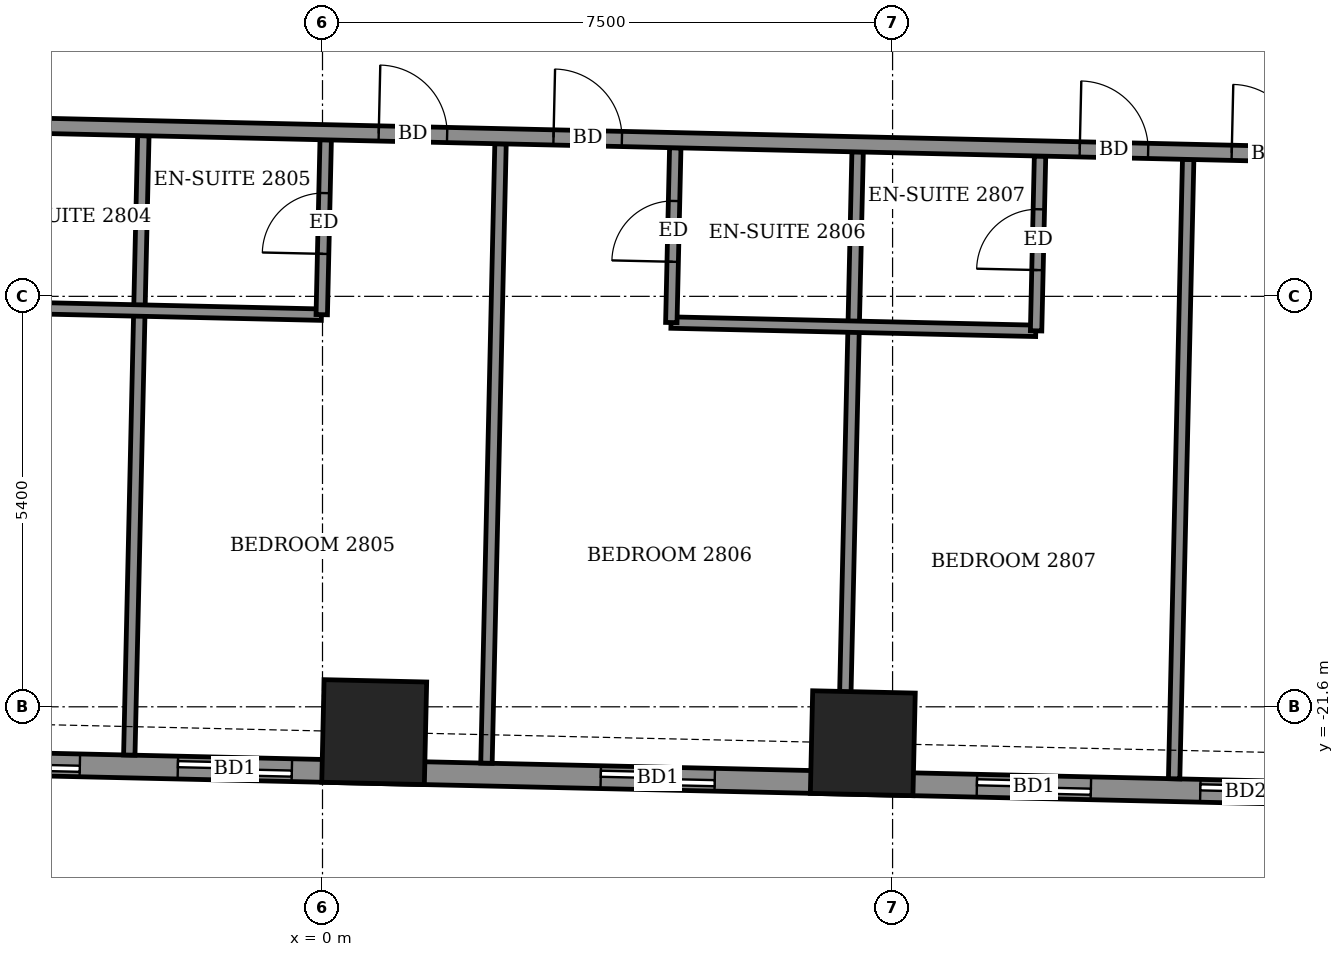
"""IFC4 building model, lengths in metres.
Left out: names, types, materials, properties, quantities, classifications, styles, units other than length and angle.
Written with IfcOpenShell. Run it as: python <this file> out.ifc"""

import sys

from ifc_helpers import new_model, si_unit, direction, frame, frame_2d, origin, origin_2d, place, context, subcontext, project, spatial, rectangle, extrude, element, fill, save


model = new_model("IFC4")
c1 = context("Model", 3, precision=1e-05, world=origin(), true_north=direction((0.0, 1.0)))
c2 = subcontext(c1, "Body", "Model", "MODEL_VIEW")
j1 = project(units=[si_unit("LENGTHUNIT", "METRE"), si_unit("PLANEANGLEUNIT", "RADIAN")], contexts=[c1])
p1 = place(None, origin())
s1 = spatial("IfcSite", under=j1, at=p1, CompositionType="ELEMENT")
p2 = place(p1, origin())
s2 = spatial("IfcBuilding", under=s1, at=p2, CompositionType="ELEMENT")
p3 = place(p2, frame((0.0, 0.0, 112.7)))
s3 = spatial("IfcBuildingStorey", under=s2, at=p3, CompositionType="ELEMENT", Elevation=112.7)
for number, where, z_axis, x_axis in (
    (1, (0.68, -21.933, -0.55), (0.0, 0.0, 1.0), (1.0, -0.023, 0.0)),
    (2, (7.108, -22.079, -0.55), (0.0, 0.0, 1.0), (1.0, -0.023, 0.0)),
):
    element("IfcColumn", number, at=place(p3, frame(where, z_axis=z_axis, x_axis=x_axis)), inside=s3, PredefinedType="COLUMN", context=c2, shape_type="SweptSolid", body=[
        extrude(rectangle(XDim=1.35, YDim=1.35, at=origin_2d()), origin(), (0.0, 0.0, 1.0), 3.6),
    ])
p4 = place(p3, frame((-24.894, -21.878, 0.0), z_axis=(0.0, 0.0, 1.0), x_axis=(0.999742689045, -0.022683820265, 0.0)))
e3 = element("IfcWall", 3, at=p4, inside=s3, PredefinedType="SOLIDWALL", context=c2, shape_type="SweptSolid", body=[
    extrude(rectangle(XDim=44.708, YDim=0.3, at=frame_2d((22.354, 0.0))), origin(), (0.0, 0.0, 1.0), 3.05),
])
p5 = place(p4, frame((1.902, 0.0, 0.0)))
e4 = element("IfcOpeningElement", 4, at=p5, cuts=e3, PredefinedType="OPENING", context=c2, shape_type="SweptSolid", body=[
    extrude(rectangle(XDim=1.5, YDim=2.4, at=frame_2d((0.75, 1.2))), frame((0.0, 0.16, 0.0), z_axis=(0.0, -1.0, 0.0), x_axis=(1.0, 0.0, 0.0)), (0.0, 0.0, 1.0), 0.32),
])
p6 = place(p4, frame((7.178, 0.0, 0.0)))
e5 = element("IfcOpeningElement", 5, at=p6, cuts=e3, PredefinedType="OPENING", context=c2, shape_type="SweptSolid", body=[
    extrude(rectangle(XDim=1.2, YDim=2.4, at=frame_2d((0.6, 1.2))), frame((0.0, 0.16, 0.0), z_axis=(0.0, -1.0, 0.0), x_axis=(1.0, 0.0, 0.0)), (0.0, 0.0, 1.0), 0.32),
])
p7 = place(p4, frame((9.817, 0.0, 0.0)))
e6 = element("IfcOpeningElement", 6, at=p7, cuts=e3, PredefinedType="OPENING", context=c2, shape_type="SweptSolid", body=[
    extrude(rectangle(XDim=1.5, YDim=2.4, at=frame_2d((0.75, 1.2))), frame((0.0, 0.16, 0.0), z_axis=(0.0, -1.0, 0.0), x_axis=(1.0, 0.0, 0.0)), (0.0, 0.0, 1.0), 0.32),
])
p8 = place(p4, frame((14.9, 0.0, 0.0)))
e7 = element("IfcOpeningElement", 7, at=p8, cuts=e3, PredefinedType="OPENING", context=c2, shape_type="SweptSolid", body=[
    extrude(rectangle(XDim=1.5, YDim=2.4, at=frame_2d((0.75, 1.2))), frame((0.0, 0.16, 0.0), z_axis=(0.0, -1.0, 0.0), x_axis=(1.0, 0.0, 0.0)), (0.0, 0.0, 1.0), 0.32),
])
p9 = place(p4, frame((20.207, 0.0, 0.0)))
e8 = element("IfcOpeningElement", 8, at=p9, cuts=e3, PredefinedType="OPENING", context=c2, shape_type="SweptSolid", body=[
    extrude(rectangle(XDim=1.5, YDim=2.4, at=frame_2d((0.75, 1.2))), frame((0.0, 0.16, 0.0), z_axis=(0.0, -1.0, 0.0), x_axis=(1.0, 0.0, 0.0)), (0.0, 0.0, 1.0), 0.32),
])
p10 = place(p4, frame((22.997, 0.0, 0.0)))
e9 = element("IfcOpeningElement", 9, at=p10, cuts=e3, PredefinedType="OPENING", context=c2, shape_type="SweptSolid", body=[
    extrude(rectangle(XDim=1.5, YDim=2.4, at=frame_2d((0.75, 1.2))), frame((0.0, 0.16, 0.0), z_axis=(0.0, -1.0, 0.0), x_axis=(1.0, 0.0, 0.0)), (0.0, 0.0, 1.0), 0.32),
])
p11 = place(p4, frame((28.562, 0.0, 0.0)))
e10 = element("IfcOpeningElement", 10, at=p11, cuts=e3, PredefinedType="OPENING", context=c2, shape_type="SweptSolid", body=[
    extrude(rectangle(XDim=1.5, YDim=2.4, at=frame_2d((0.75, 1.2))), frame((0.0, 0.16, 0.0), z_axis=(0.0, -1.0, 0.0), x_axis=(1.0, 0.0, 0.0)), (0.0, 0.0, 1.0), 0.32),
])
p12 = place(p4, frame((33.512, 0.0, 0.0)))
e11 = element("IfcOpeningElement", 11, at=p12, cuts=e3, PredefinedType="OPENING", context=c2, shape_type="SweptSolid", body=[
    extrude(rectangle(XDim=1.5, YDim=2.4, at=frame_2d((0.75, 1.2))), frame((0.0, 0.16, 0.0), z_axis=(0.0, -1.0, 0.0), x_axis=(1.0, 0.0, 0.0)), (0.0, 0.0, 1.0), 0.32),
])
p13 = place(p4, frame((36.452, 0.0, 0.0)))
e12 = element("IfcOpeningElement", 12, at=p13, cuts=e3, PredefinedType="OPENING", context=c2, shape_type="SweptSolid", body=[
    extrude(rectangle(XDim=1.2, YDim=2.4, at=frame_2d((0.6, 1.2))), frame((0.0, 0.16, 0.0), z_axis=(0.0, -1.0, 0.0), x_axis=(1.0, 0.0, 0.0)), (0.0, 0.0, 1.0), 0.32),
])
p14 = place(p4, frame((40.923, 0.0, 0.9)))
e13 = element("IfcOpeningElement", 13, at=p14, cuts=e3, PredefinedType="OPENING", context=c2, shape_type="SweptSolid", body=[
    extrude(rectangle(XDim=2.4, YDim=1.5, at=frame_2d((1.2, 0.75))), frame((0.0, 0.16, 0.0), z_axis=(0.0, -1.0, 0.0), x_axis=(1.0, 0.0, 0.0)), (0.0, 0.0, 1.0), 0.32),
])
p15 = place(p3, frame((-2.542, -22.235, 0.0), z_axis=(0.0, 0.0, 1.0), x_axis=(0.022705755232, 0.999742191107, 0.0)))
e14 = element("IfcWall", 14, at=p15, inside=s3, PredefinedType="PARTITIONING", context=c2, shape_type="SweptSolid", body=[
    extrude(rectangle(XDim=8.15, YDim=0.15, at=frame_2d((4.075, 0.0))), origin(), (0.0, 0.0, 1.0), 2.55),
])
p16 = place(p3, frame((2.157, -22.342, 0.0), z_axis=(0.0, 0.0, 1.0), x_axis=(0.022706435224, 0.999742175663, 0.0)))
e15 = element("IfcWall", 15, at=p16, inside=s3, PredefinedType="PARTITIONING", context=c2, shape_type="SweptSolid", body=[
    extrude(rectangle(XDim=8.15, YDim=0.15, at=frame_2d((4.075, 0.0))), origin(), (0.0, 0.0, 1.0), 2.55),
])
p17 = place(p3, frame((6.855, -22.448, 0.0), z_axis=(0.0, 0.0, 1.0), x_axis=(0.022706435224, 0.999742175663, 0.0)))
e16 = element("IfcWall", 16, at=p17, inside=s3, PredefinedType="PARTITIONING", context=c2, shape_type="SweptSolid", body=[
    extrude(rectangle(XDim=8.15, YDim=0.15, at=frame_2d((4.075, 0.0))), origin(), (0.0, 0.0, 1.0), 3.05),
])
p18 = place(p3, frame((11.204, -22.547, 0.0), z_axis=(0.0, 0.0, 1.0), x_axis=(0.022675815822, 0.999742870631, 0.0)))
e17 = element("IfcWall", 17, at=p18, inside=s3, PredefinedType="PARTITIONING", context=c2, shape_type="SweptSolid", body=[
    extrude(rectangle(XDim=8.15, YDim=0.15, at=frame_2d((4.075, 0.0))), origin(), (0.0, 0.0, 1.0), 2.55),
])
p19 = place(p3, frame((-4.813, -16.332, 0.0), z_axis=(0.0, 0.0, 1.0), x_axis=(0.999742701292, -0.022683280499, 0.0)))
e18 = element("IfcWall", 18, at=p19, inside=s3, PredefinedType="PARTITIONING", context=c2, shape_type="SweptSolid", body=[
    extrude(rectangle(XDim=4.8, YDim=0.15, at=frame_2d((2.4, 0.0))), origin(), (0.0, 0.0, 1.0), 3.05),
])
p20 = place(p3, frame((-0.01, -16.441, 0.0), z_axis=(0.0, 0.0, 1.0), x_axis=(0.022605686808, 0.999744458811, 0.0)))
e19 = element("IfcWall", 19, at=p20, inside=s3, PredefinedType="PARTITIONING", context=c2, shape_type="SweptSolid", body=[
    extrude(rectangle(XDim=2.3, YDim=0.15, at=frame_2d((1.15, 0.0))), origin(), (0.0, 0.0, 1.0), 3.05),
])
p21 = place(p20, frame((0.8, 0.0, 0.0)))
e20 = element("IfcOpeningElement", 20, at=p21, cuts=e19, PredefinedType="OPENING", context=c2, shape_type="SweptSolid", body=[
    extrude(rectangle(XDim=0.8, YDim=2.1, at=frame_2d((0.4, 1.05))), frame((0.0, 0.085, 0.0), z_axis=(0.0, -1.0, 0.0), x_axis=(1.0, 0.0, 0.0)), (0.0, 0.0, 1.0), 0.17),
])
p22 = place(p3, frame((4.585, -16.545, 0.0), z_axis=(0.0, 0.0, 1.0), x_axis=(0.99974154664, -0.022734113616, 0.0)))
e21 = element("IfcWall", 21, at=p22, inside=s3, PredefinedType="PARTITIONING", context=c2, shape_type="SweptSolid", body=[
    extrude(rectangle(XDim=4.8, YDim=0.15, at=frame_2d((2.4, 0.0))), origin(), (0.0, 0.0, 1.0), 3.05),
])
p23 = place(p3, frame((4.589, -16.545, 0.0), z_axis=(0.0, 0.0, 1.0), x_axis=(0.022615284993, 0.999744241736, 0.0)))
e22 = element("IfcWall", 22, at=p23, inside=s3, PredefinedType="PARTITIONING", context=c2, shape_type="SweptSolid", body=[
    extrude(rectangle(XDim=2.299, YDim=0.15, at=frame_2d((1.15, 0.0))), origin(), (0.0, 0.0, 1.0), 3.05),
])
p24 = place(p23, frame((0.8, 0.0, 0.0)))
e23 = element("IfcOpeningElement", 23, at=p24, cuts=e22, PredefinedType="OPENING", context=c2, shape_type="SweptSolid", body=[
    extrude(rectangle(XDim=0.8, YDim=2.1, at=frame_2d((0.4, 1.05))), frame((0.0, 0.085, 0.0), z_axis=(0.0, -1.0, 0.0), x_axis=(1.0, 0.0, 0.0)), (0.0, 0.0, 1.0), 0.17),
])
p25 = place(p3, frame((9.388, -16.654, 0.0), z_axis=(0.0, 0.0, 1.0), x_axis=(0.022612884682, 0.999744296031, 0.0)))
e24 = element("IfcWall", 24, at=p25, inside=s3, PredefinedType="PARTITIONING", context=c2, shape_type="SweptSolid", body=[
    extrude(rectangle(XDim=2.3, YDim=0.15, at=frame_2d((1.15, 0.0))), origin(), (0.0, 0.0, 1.0), 3.05),
])
p26 = place(p25, frame((0.8, 0.0, 0.0)))
e25 = element("IfcOpeningElement", 25, at=p26, cuts=e24, PredefinedType="OPENING", context=c2, shape_type="SweptSolid", body=[
    extrude(rectangle(XDim=0.8, YDim=2.1, at=frame_2d((0.4, 1.05))), frame((0.0, 0.085, 0.0), z_axis=(0.0, -1.0, 0.0), x_axis=(1.0, 0.0, 0.0)), (0.0, 0.0, 1.0), 0.17),
])
p27 = place(p3, frame((-26.978, -13.428, 0.0), z_axis=(0.0, 0.0, 1.0), x_axis=(0.999742553034, -0.02268981385, 0.0)))
e26 = element("IfcWall", 26, at=p27, inside=s3, PredefinedType="PARTITIONING", context=c2, shape_type="SweptSolid", body=[
    extrude(rectangle(XDim=50.733, YDim=0.2, at=frame_2d((25.366, 0.0))), origin(), (0.0, 0.0, 1.0), 3.05),
])
p28 = place(p27, frame((2.293, 0.0, 0.0)))
e27 = element("IfcOpeningElement", 27, at=p28, cuts=e26, PredefinedType="OPENING", context=c2, shape_type="SweptSolid", body=[
    extrude(rectangle(XDim=1.0, YDim=2.1, at=frame_2d((0.5, 1.05))), frame((0.0, 0.11, 0.0), z_axis=(0.0, -1.0, 0.0), x_axis=(1.0, 0.0, 0.0)), (0.0, 0.0, 1.0), 0.22),
])
p29 = place(p27, frame((9.65, 0.0, 0.0)))
e28 = element("IfcOpeningElement", 28, at=p29, cuts=e26, PredefinedType="OPENING", context=c2, shape_type="SweptSolid", body=[
    extrude(rectangle(XDim=0.9, YDim=2.1, at=frame_2d((0.45, 1.05))), frame((0.0, 0.11, 0.0), z_axis=(0.0, -1.0, 0.0), x_axis=(1.0, 0.0, 0.0)), (0.0, 0.0, 1.0), 0.22),
])
p30 = place(p27, frame((11.75, 0.0, 0.0)))
e29 = element("IfcOpeningElement", 29, at=p30, cuts=e26, PredefinedType="OPENING", context=c2, shape_type="SweptSolid", body=[
    extrude(rectangle(XDim=0.9, YDim=2.1, at=frame_2d((0.45, 1.05))), frame((0.0, 0.11, 0.0), z_axis=(0.0, -1.0, 0.0), x_axis=(1.0, 0.0, 0.0)), (0.0, 0.0, 1.0), 0.22),
])
p31 = place(p27, frame((18.675, 0.0, 0.0)))
e30 = element("IfcOpeningElement", 30, at=p31, cuts=e26, PredefinedType="OPENING", context=c2, shape_type="SweptSolid", body=[
    extrude(rectangle(XDim=0.9, YDim=2.1, at=frame_2d((0.45, 1.05))), frame((0.0, 0.11, 0.0), z_axis=(0.0, -1.0, 0.0), x_axis=(1.0, 0.0, 0.0)), (0.0, 0.0, 1.0), 0.22),
])
p32 = place(p27, frame((20.75, 0.0, 0.0)))
e31 = element("IfcOpeningElement", 31, at=p32, cuts=e26, PredefinedType="OPENING", context=c2, shape_type="SweptSolid", body=[
    extrude(rectangle(XDim=0.9, YDim=2.1, at=frame_2d((0.45, 1.05))), frame((0.0, 0.11, 0.0), z_axis=(0.0, -1.0, 0.0), x_axis=(1.0, 0.0, 0.0)), (0.0, 0.0, 1.0), 0.22),
])
p33 = place(p27, frame((27.725, 0.0, 0.0)))
e32 = element("IfcOpeningElement", 32, at=p33, cuts=e26, PredefinedType="OPENING", context=c2, shape_type="SweptSolid", body=[
    extrude(rectangle(XDim=0.9, YDim=2.1, at=frame_2d((0.45, 1.05))), frame((0.0, 0.11, 0.0), z_axis=(0.0, -1.0, 0.0), x_axis=(1.0, 0.0, 0.0)), (0.0, 0.0, 1.0), 0.22),
])
p34 = place(p27, frame((30.025, 0.0, 0.0)))
e33 = element("IfcOpeningElement", 33, at=p34, cuts=e26, PredefinedType="OPENING", context=c2, shape_type="SweptSolid", body=[
    extrude(rectangle(XDim=0.9, YDim=2.1, at=frame_2d((0.45, 1.05))), frame((0.0, 0.11, 0.0), z_axis=(0.0, -1.0, 0.0), x_axis=(1.0, 0.0, 0.0)), (0.0, 0.0, 1.0), 0.22),
])
p35 = place(p27, frame((36.95, 0.0, 0.0)))
e34 = element("IfcOpeningElement", 34, at=p35, cuts=e26, PredefinedType="OPENING", context=c2, shape_type="SweptSolid", body=[
    extrude(rectangle(XDim=0.9, YDim=2.1, at=frame_2d((0.45, 1.05))), frame((0.0, 0.11, 0.0), z_axis=(0.0, -1.0, 0.0), x_axis=(1.0, 0.0, 0.0)), (0.0, 0.0, 1.0), 0.22),
])
p36 = place(p27, frame((38.95, 0.0, 0.0)))
e35 = element("IfcOpeningElement", 35, at=p36, cuts=e26, PredefinedType="OPENING", context=c2, shape_type="SweptSolid", body=[
    extrude(rectangle(XDim=0.9, YDim=2.1, at=frame_2d((0.45, 1.05))), frame((0.0, 0.11, 0.0), z_axis=(0.0, -1.0, 0.0), x_axis=(1.0, 0.0, 0.0)), (0.0, 0.0, 1.0), 0.22),
])
p37 = place(p27, frame((48.179, 0.0, 0.0)))
e36 = element("IfcOpeningElement", 36, at=p37, cuts=e26, PredefinedType="OPENING", context=c2, shape_type="SweptSolid", body=[
    extrude(rectangle(XDim=1.0, YDim=2.1, at=frame_2d((0.5, 1.05))), frame((0.0, 0.11, 0.0), z_axis=(0.0, -1.0, 0.0), x_axis=(1.0, 0.0, 0.0)), (0.0, 0.0, 1.0), 0.22),
])
p38 = place(p27, frame((43.575, 0.0, 0.0)))
e37 = element("IfcOpeningElement", 37, at=p38, cuts=e26, PredefinedType="OPENING", context=c2, shape_type="SweptSolid", body=[
    extrude(rectangle(XDim=0.9, YDim=2.1, at=frame_2d((0.45, 1.05))), frame((0.0, 0.11, 0.0), z_axis=(0.0, -1.0, 0.0), x_axis=(1.0, 0.0, 0.0)), (0.0, 0.0, 1.0), 0.22),
])
p39 = place(p9, origin())
e38 = element("IfcDoor", 38, at=p39, inside=s3, OperationType="SLIDING_TO_LEFT", PredefinedType="DOOR", context=c2, shape_type="SweptSolid", body=[
    extrude(rectangle(XDim=1.5, YDim=2.4, at=frame_2d((0.75, 1.2))), frame((0.0, 0.025, 0.0), z_axis=(0.0, -1.0, 0.0), x_axis=(1.0, 0.0, 0.0)), (0.0, 0.0, 1.0), 0.05),
])
fill(e8, e38)
p40 = place(p10, origin())
e39 = element("IfcDoor", 39, at=p40, inside=s3, OperationType="SLIDING_TO_LEFT", PredefinedType="DOOR", context=c2, shape_type="SweptSolid", body=[
    extrude(rectangle(XDim=1.5, YDim=2.4, at=frame_2d((0.75, 1.2))), frame((0.0, 0.025, 0.0), z_axis=(0.0, -1.0, 0.0), x_axis=(1.0, 0.0, 0.0)), (0.0, 0.0, 1.0), 0.05),
])
fill(e9, e39)
p41 = place(p11, origin())
e40 = element("IfcDoor", 40, at=p41, inside=s3, OperationType="SLIDING_TO_LEFT", PredefinedType="DOOR", context=c2, shape_type="SweptSolid", body=[
    extrude(rectangle(XDim=1.5, YDim=2.4, at=frame_2d((0.75, 1.2))), frame((0.0, 0.025, 0.0), z_axis=(0.0, -1.0, 0.0), x_axis=(1.0, 0.0, 0.0)), (0.0, 0.0, 1.0), 0.05),
])
fill(e10, e40)
p42 = place(p12, origin())
e41 = element("IfcDoor", 41, at=p42, inside=s3, OperationType="SLIDING_TO_LEFT", PredefinedType="DOOR", context=c2, shape_type="SweptSolid", body=[
    extrude(rectangle(XDim=1.5, YDim=2.4, at=frame_2d((0.75, 1.2))), frame((0.0, 0.025, 0.0), z_axis=(0.0, -1.0, 0.0), x_axis=(1.0, 0.0, 0.0)), (0.0, 0.0, 1.0), 0.05),
])
fill(e11, e41)
p43 = place(p13, origin())
e42 = element("IfcDoor", 42, at=p43, inside=s3, OperationType="SLIDING_TO_LEFT", PredefinedType="DOOR", context=c2, shape_type="SweptSolid", body=[
    extrude(rectangle(XDim=1.2, YDim=2.4, at=frame_2d((0.6, 1.2))), frame((0.0, 0.025, 0.0), z_axis=(0.0, -1.0, 0.0), x_axis=(1.0, 0.0, 0.0)), (0.0, 0.0, 1.0), 0.05),
])
fill(e12, e42)
p44 = place(p33, origin())
e43 = element("IfcDoor", 43, at=p44, inside=s3, OperationType="SINGLE_SWING_LEFT", PredefinedType="DOOR", context=c2, shape_type="SweptSolid", body=[
    extrude(rectangle(XDim=0.9, YDim=2.1, at=frame_2d((0.45, 1.05))), frame((0.0, 0.025, 0.0), z_axis=(0.0, -1.0, 0.0), x_axis=(1.0, 0.0, 0.0)), (0.0, 0.0, 1.0), 0.05),
])
fill(e32, e43)
p45 = place(p21, origin())
e44 = element("IfcDoor", 44, at=p45, inside=s3, OperationType="SINGLE_SWING_LEFT", PredefinedType="DOOR", context=c2, shape_type="SweptSolid", body=[
    extrude(rectangle(XDim=0.8, YDim=2.1, at=frame_2d((0.4, 1.05))), frame((0.0, 0.025, 0.0), z_axis=(0.0, -1.0, 0.0), x_axis=(1.0, 0.0, 0.0)), (0.0, 0.0, 1.0), 0.05),
])
fill(e20, e44)
p46 = place(p34, origin())
e45 = element("IfcDoor", 45, at=p46, inside=s3, OperationType="SINGLE_SWING_RIGHT", PredefinedType="DOOR", context=c2, shape_type="SweptSolid", body=[
    extrude(rectangle(XDim=0.9, YDim=2.1, at=frame_2d((0.45, 1.05))), frame((0.0, 0.025, 0.0), z_axis=(0.0, -1.0, 0.0), x_axis=(1.0, 0.0, 0.0)), (0.0, 0.0, 1.0), 0.05),
])
fill(e33, e45)
p47 = place(p24, origin())
e46 = element("IfcDoor", 46, at=p47, inside=s3, OperationType="SINGLE_SWING_RIGHT", PredefinedType="DOOR", context=c2, shape_type="SweptSolid", body=[
    extrude(rectangle(XDim=0.8, YDim=2.1, at=frame_2d((0.4, 1.05))), frame((0.0, 0.025, 0.0), z_axis=(0.0, -1.0, 0.0), x_axis=(1.0, 0.0, 0.0)), (0.0, 0.0, 1.0), 0.05),
])
fill(e23, e46)
p48 = place(p35, origin())
e47 = element("IfcDoor", 47, at=p48, inside=s3, OperationType="SINGLE_SWING_LEFT", PredefinedType="DOOR", context=c2, shape_type="SweptSolid", body=[
    extrude(rectangle(XDim=0.9, YDim=2.1, at=frame_2d((0.45, 1.05))), frame((0.0, 0.025, 0.0), z_axis=(0.0, -1.0, 0.0), x_axis=(1.0, 0.0, 0.0)), (0.0, 0.0, 1.0), 0.05),
])
fill(e34, e47)
p49 = place(p26, origin())
e48 = element("IfcDoor", 48, at=p49, inside=s3, OperationType="SINGLE_SWING_LEFT", PredefinedType="DOOR", context=c2, shape_type="SweptSolid", body=[
    extrude(rectangle(XDim=0.8, YDim=2.1, at=frame_2d((0.4, 1.05))), frame((0.0, 0.025, 0.0), z_axis=(0.0, -1.0, 0.0), x_axis=(1.0, 0.0, 0.0)), (0.0, 0.0, 1.0), 0.05),
])
fill(e25, e48)
p50 = place(p36, origin())
e49 = element("IfcDoor", 49, at=p50, inside=s3, OperationType="SINGLE_SWING_RIGHT", PredefinedType="DOOR", context=c2, shape_type="SweptSolid", body=[
    extrude(rectangle(XDim=0.9, YDim=2.1, at=frame_2d((0.45, 1.05))), frame((0.0, 0.025, 0.0), z_axis=(0.0, -1.0, 0.0), x_axis=(1.0, 0.0, 0.0)), (0.0, 0.0, 1.0), 0.05),
])
fill(e35, e49)
save(model, sys.argv[1])
